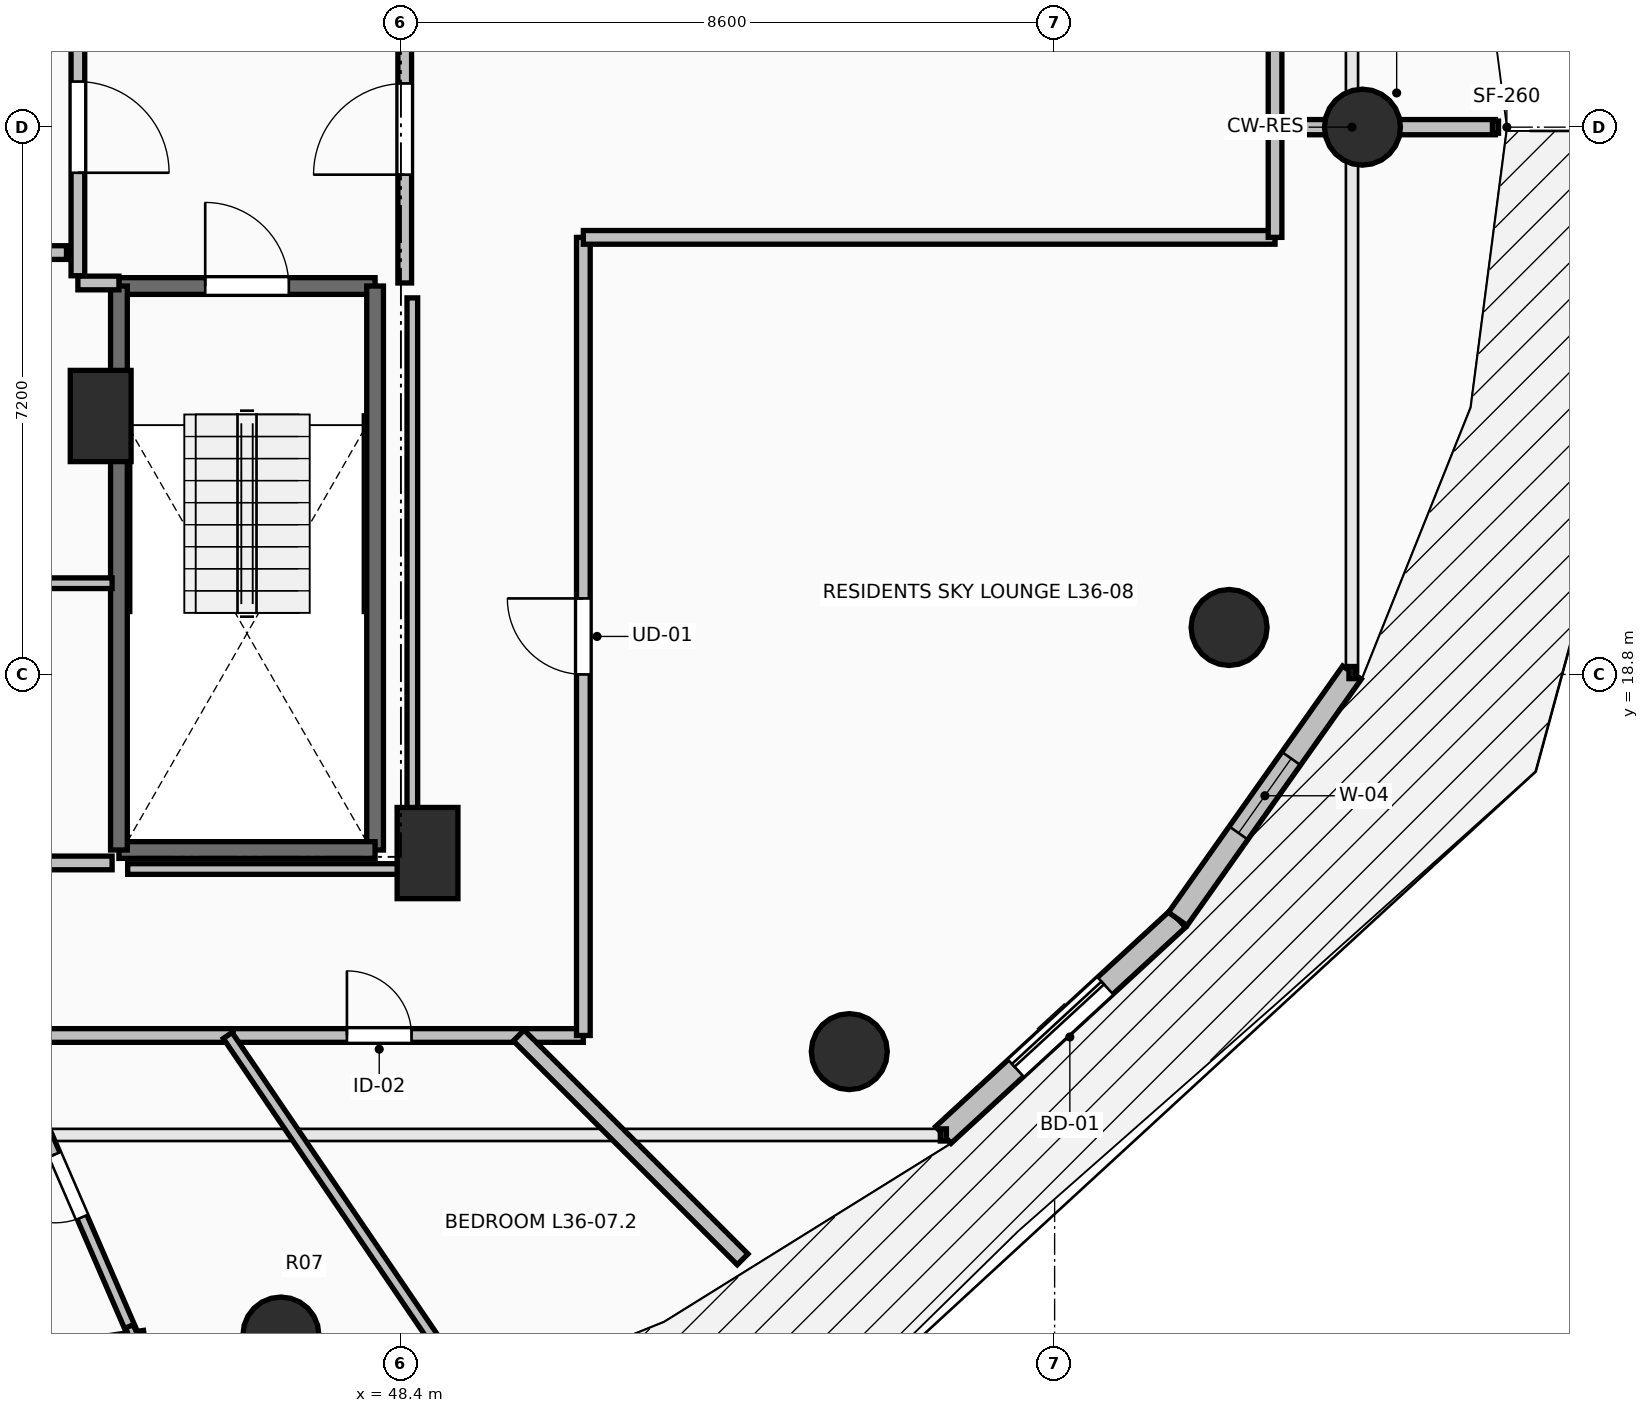
"""IFC4 building model, lengths in metres.
Left out: names, types, materials, properties, quantities, classifications, styles, units other than length and angle.
Written with IfcOpenShell. Run it as: python <this file> out.ifc"""

import sys

from ifc_helpers import new_model, si_unit, direction, frame, frame_2d, origin, origin_2d, place, context, subcontext, project, spatial, rectangle, circle, extrude, element, fill, save


model = new_model("IFC4")
c1 = context("Model", 3, precision=1e-05, world=origin(), true_north=direction((0.0, 1.0)))
c2 = subcontext(c1, "Body", "Model", "MODEL_VIEW")
j1 = project(units=[si_unit("LENGTHUNIT", "METRE"), si_unit("PLANEANGLEUNIT", "RADIAN")], contexts=[c1])
p1 = place(None, origin())
s1 = spatial("IfcSite", under=j1, at=p1, CompositionType="ELEMENT")
p2 = place(p1, origin())
s2 = spatial("IfcBuilding", under=s1, at=p2, CompositionType="ELEMENT")
p3 = place(p2, frame((0.0, 0.0, 136.1)))
s3 = spatial("IfcBuildingStorey", under=s2, at=p3, CompositionType="ELEMENT", Elevation=136.1)
for number, where, z_axis, x_axis in (
    (1, (61.05, 26.0, 0.0), (0.0, 0.0, 1.0), (1.0, 0.0, 0.0)),
    (2, (46.821, 10.109, 0.0), (0.0, 0.0, 1.0), (0.383, -0.924, 0.0)),
    (3, (54.299, 13.838, 0.0), (0.0, 0.0, 1.0), (0.707, -0.707, 0.0)),
    (4, (59.295, 19.418, 0.0), (0.0, 0.0, 1.0), (0.924, -0.383, 0.0)),
):
    element("IfcColumn", number, at=place(p3, frame(where, z_axis=z_axis, x_axis=x_axis)), inside=s3, PredefinedType="COLUMN", context=c2, shape_type="SweptSolid", body=[
        extrude(circle(Radius=0.5, at=origin_2d()), origin(), (0.0, 0.0, 1.0), 3.5),
    ])
for number, where, z_axis, x_axis in (
    (5, (48.75, 16.45, 0.0), (0.0, 0.0, 1.0), (1.0, 0.0, 0.0)),
    (6, (44.45, 22.2, 0.0), (0.0, 0.0, 1.0), (1.0, 0.0, 0.0)),
):
    element("IfcColumn", number, at=place(p3, frame(where, z_axis=z_axis, x_axis=x_axis)), inside=s3, PredefinedType="PILASTER", context=c2, shape_type="SweptSolid", body=[
        extrude(rectangle(XDim=0.8, YDim=1.2, at=origin_2d()), origin(), (0.0, 0.0, 1.0), 3.5),
    ])
p4 = place(p3, frame((55.536, 12.742, 0.0), z_axis=(0.0, 0.0, 1.0), x_axis=(0.735477154165, 0.677549522693, 0.0)))
e7 = element("IfcWall", 7, at=p4, inside=s3, PredefinedType="STANDARD", context=c2, shape_type="SweptSolid", body=[
    extrude(rectangle(XDim=4.194, YDim=0.3, at=frame_2d((2.097, 0.0))), origin(), (0.0, 0.0, 1.0), 3.24),
])
p5 = place(p4, frame((1.297, 0.0, 0.0)))
e8 = element("IfcOpeningElement", 8, at=p5, cuts=e7, PredefinedType="OPENING", context=c2, shape_type="SweptSolid", body=[
    extrude(rectangle(XDim=1.6, YDim=2.3, at=frame_2d((0.8, 1.15))), frame((0.0, 0.165, 0.0), z_axis=(0.0, -1.0, 0.0), x_axis=(1.0, 0.0, 0.0)), (0.0, 0.0, 1.0), 0.33),
])
p6 = place(p3, frame((58.62, 15.583, 0.0), z_axis=(0.0, 0.0, 1.0), x_axis=(0.577269753207, 0.816553508371, 0.0)))
e9 = element("IfcWall", 9, at=p6, inside=s3, PredefinedType="STANDARD", context=c2, shape_type="SweptSolid", body=[
    extrude(rectangle(XDim=3.97, YDim=0.3, at=frame_2d((1.985, 0.0))), origin(), (0.0, 0.0, 1.0), 3.24),
])
p7 = place(p6, frame((1.385, 0.0, 0.85)))
e10 = element("IfcOpeningElement", 10, at=p7, cuts=e9, PredefinedType="OPENING", context=c2, shape_type="SweptSolid", body=[
    extrude(rectangle(XDim=1.2, YDim=2.1, at=frame_2d((0.6, 1.05))), frame((0.0, 0.165, 0.0), z_axis=(0.0, -1.0, 0.0), x_axis=(1.0, 0.0, 0.0)), (0.0, 0.0, 1.0), 0.33),
])
p8 = place(p3, frame((44.69, 23.91, 0.0), z_axis=(0.0, 0.0, 1.0), x_axis=(1.0, 0.0, 0.0)))
e11 = element("IfcWall", 11, at=p8, inside=s3, PredefinedType="SOLIDWALL", context=c2, shape_type="SweptSolid", body=[
    extrude(rectangle(XDim=3.37, YDim=0.22, at=frame_2d((1.685, 0.0))), origin(), (0.0, 0.0, 1.0), 3.24),
])
p9 = place(p8, frame((1.135, 0.0, 0.0)))
e12 = element("IfcOpeningElement", 12, at=p9, cuts=e11, PredefinedType="OPENING", context=c2, shape_type="SweptSolid", body=[
    extrude(rectangle(XDim=1.1, YDim=2.15, at=frame_2d((0.55, 1.075))), frame((0.0, 0.125, 0.0), z_axis=(0.0, -1.0, 0.0), x_axis=(1.0, 0.0, 0.0)), (0.0, 0.0, 1.0), 0.25),
])
p10 = place(p3, frame((48.06, 23.91, 0.0), z_axis=(0.0, 0.0, 1.0), x_axis=(0.0, -1.0, 0.0)))
e13 = element("IfcWall", 13, at=p10, inside=s3, PredefinedType="SOLIDWALL", context=c2, shape_type="SweptSolid", body=[
    extrude(rectangle(XDim=7.42, YDim=0.22, at=frame_2d((3.71, 0.0))), origin(), (0.0, 0.0, 1.0), 3.24),
])
p11 = place(p3, frame((48.06, 16.49, 0.0), z_axis=(0.0, 0.0, 1.0), x_axis=(-1.0, 0.0, 0.0)))
e14 = element("IfcWall", 14, at=p11, inside=s3, PredefinedType="SOLIDWALL", context=c2, shape_type="SweptSolid", body=[
    extrude(rectangle(XDim=3.37, YDim=0.22, at=frame_2d((1.685, 0.0))), origin(), (0.0, 0.0, 1.0), 3.24),
])
p12 = place(p3, frame((44.69, 16.49, 0.0), z_axis=(0.0, 0.0, 1.0), x_axis=(0.0, 1.0, 0.0)))
e15 = element("IfcWall", 15, at=p12, inside=s3, PredefinedType="SOLIDWALL", context=c2, shape_type="SweptSolid", body=[
    extrude(rectangle(XDim=7.42, YDim=0.22, at=frame_2d((3.71, 0.0))), origin(), (0.0, 0.0, 1.0), 3.24),
])
p13 = place(p3, frame((44.15, 27.955, 0.0), z_axis=(0.0, 0.0, 1.0), x_axis=(0.0, -1.0, 0.0)))
e16 = element("IfcWall", 16, at=p13, inside=s3, PredefinedType="PARTITIONING", context=c2, shape_type="SweptSolid", body=[
    extrude(rectangle(XDim=3.91, YDim=0.18, at=frame_2d((1.955, 0.0))), origin(), (0.0, 0.0, 1.0), 3.24),
])
p14 = place(p13, frame((1.355, 0.0, 0.0)))
e17 = element("IfcOpeningElement", 17, at=p14, cuts=e16, PredefinedType="OPENING", context=c2, shape_type="SweptSolid", body=[
    extrude(rectangle(XDim=1.2, YDim=2.15, at=frame_2d((0.6, 1.075))), frame((0.0, 0.105, 0.0), z_axis=(0.0, -1.0, 0.0), x_axis=(1.0, 0.0, 0.0)), (0.0, 0.0, 1.0), 0.21),
])
p15 = place(p3, frame((44.15, 23.95, 0.0), z_axis=(0.0, 0.0, 1.0), x_axis=(1.0, 0.0, 0.0)))
e18 = element("IfcWall", 18, at=p15, inside=s3, PredefinedType="PARTITIONING", context=c2, shape_type="SweptSolid", body=[
    extrude(rectangle(XDim=0.54, YDim=0.18, at=frame_2d((0.27, 0.0))), origin(), (0.0, 0.0, 1.0), 3.24),
])
p16 = place(p3, frame((48.45, 23.95, 0.0), z_axis=(0.0, 0.0, 1.0), x_axis=(0.0, 1.0, 0.0)))
e19 = element("IfcWall", 19, at=p16, inside=s3, PredefinedType="PARTITIONING", context=c2, shape_type="SweptSolid", body=[
    extrude(rectangle(XDim=4.05, YDim=0.18, at=frame_2d((2.025, 0.0))), origin(), (0.0, 0.0, 1.0), 3.24),
])
p17 = place(p16, frame((1.425, 0.0, 0.0)))
e20 = element("IfcOpeningElement", 20, at=p17, cuts=e19, PredefinedType="OPENING", context=c2, shape_type="SweptSolid", body=[
    extrude(rectangle(XDim=1.2, YDim=2.15, at=frame_2d((0.6, 1.075))), frame((0.0, 0.105, 0.0), z_axis=(0.0, -1.0, 0.0), x_axis=(1.0, 0.0, 0.0)), (0.0, 0.0, 1.0), 0.21),
])
p18 = place(p3, frame((41.555, 24.35, 0.0), z_axis=(0.0, 0.0, 1.0), x_axis=(1.0, 0.0, 0.0)))
e21 = element("IfcWall", 21, at=p18, inside=s3, PredefinedType="PARTITIONING", context=c2, shape_type="SweptSolid", body=[
    extrude(rectangle(XDim=2.445, YDim=0.18, at=frame_2d((1.223, 0.0))), origin(), (0.0, 0.0, 1.0), 3.24),
])
p19 = place(p18, frame((0.798, 0.0, 0.0)))
e22 = element("IfcOpeningElement", 22, at=p19, cuts=e21, PredefinedType="OPENING", context=c2, shape_type="SweptSolid", body=[
    extrude(rectangle(XDim=0.85, YDim=2.1, at=frame_2d((0.425, 1.05))), frame((0.0, 0.105, 0.0), z_axis=(0.0, -1.0, 0.0), x_axis=(1.0, 0.0, 0.0)), (0.0, 0.0, 1.0), 0.21),
])
p20 = place(p3, frame((44.6, 20.0, 0.0), z_axis=(0.0, 0.0, 1.0), x_axis=(-1.0, 0.0, 0.0)))
e23 = element("IfcWall", 23, at=p20, inside=s3, PredefinedType="PARTITIONING", context=c2, shape_type="SweptSolid", body=[
    extrude(rectangle(XDim=3.2, YDim=0.14, at=frame_2d((1.6, 0.0))), origin(), (0.0, 0.0, 1.0), 3.24),
])
p21 = place(p3, frame((41.4, 16.32, 0.0), z_axis=(0.0, 0.0, 1.0), x_axis=(1.0, 0.0, 0.0)))
e24 = element("IfcWall", 24, at=p21, inside=s3, PredefinedType="PARTITIONING", context=c2, shape_type="SweptSolid", body=[
    extrude(rectangle(XDim=3.2, YDim=0.18, at=frame_2d((1.6, 0.0))), origin(), (0.0, 0.0, 1.0), 3.24),
])
p22 = place(p21, frame((1.2, 0.0, 0.0)))
e25 = element("IfcOpeningElement", 25, at=p22, cuts=e24, PredefinedType="OPENING", context=c2, shape_type="SweptSolid", body=[
    extrude(rectangle(XDim=0.8, YDim=2.05, at=frame_2d((0.4, 1.025))), frame((0.0, 0.105, 0.0), z_axis=(0.0, -1.0, 0.0), x_axis=(1.0, 0.0, 0.0)), (0.0, 0.0, 1.0), 0.21),
])
p23 = place(p3, frame((59.9, 25.94, 0.0), z_axis=(0.0, 0.0, 1.0), x_axis=(0.0, 1.0, 0.0)))
e26 = element("IfcWall", 26, at=p23, inside=s3, PredefinedType="PARTITIONING", context=c2, shape_type="SweptSolid", body=[
    extrude(rectangle(XDim=1.31, YDim=0.18, at=frame_2d((0.655, 0.0))), origin(), (0.0, 0.0, 1.0), 2.432),
])
p24 = place(p3, frame((43.236, 14.05, 0.0), z_axis=(0.0, 0.0, 1.0), x_axis=(1.0, 0.0, 0.0)))
e27 = element("IfcWall", 27, at=p24, inside=s3, PredefinedType="PARTITIONING", context=c2, shape_type="SweptSolid", body=[
    extrude(rectangle(XDim=2.958, YDim=0.18, at=frame_2d((1.479, 0.0))), origin(), (0.0, 0.0, 1.0), 2.432),
])
p25 = place(p3, frame((46.194, 14.05, 0.0), z_axis=(0.0, 0.0, 1.0), x_axis=(1.0, 0.0, 0.0)))
e28 = element("IfcWall", 28, at=p25, inside=s3, PredefinedType="PARTITIONING", context=c2, shape_type="SweptSolid", body=[
    extrude(rectangle(XDim=3.841, YDim=0.18, at=frame_2d((1.92, 0.0))), origin(), (0.0, 0.0, 1.0), 2.432),
])
p26 = place(p25, frame((1.496, 0.0, 0.0)))
e29 = element("IfcOpeningElement", 29, at=p26, cuts=e28, PredefinedType="OPENING", context=c2, shape_type="SweptSolid", body=[
    extrude(rectangle(XDim=0.85, YDim=2.1, at=frame_2d((0.425, 1.05))), frame((0.0, 0.105, 0.0), z_axis=(0.0, -1.0, 0.0), x_axis=(1.0, 0.0, 0.0)), (0.0, 0.0, 1.0), 0.21),
])
p27 = place(p3, frame((50.035, 14.05, 0.0), z_axis=(0.0, 0.0, 1.0), x_axis=(1.0, 0.0, 0.0)))
e30 = element("IfcWall", 30, at=p27, inside=s3, PredefinedType="PARTITIONING", context=c2, shape_type="SweptSolid", body=[
    extrude(rectangle(XDim=0.765, YDim=0.18, at=frame_2d((0.383, 0.0))), origin(), (0.0, 0.0, 1.0), 2.874),
])
p28 = place(p3, frame((50.8, 14.05, 0.0), z_axis=(0.0, 0.0, 1.0), x_axis=(0.0, 1.0, 0.0)))
e31 = element("IfcWall", 31, at=p28, inside=s3, PredefinedType="PARTITIONING", context=c2, shape_type="SweptSolid", body=[
    extrude(rectangle(XDim=10.5, YDim=0.18, at=frame_2d((5.25, 0.0))), origin(), (0.0, 0.0, 1.0), 2.432),
])
p29 = place(p28, frame((4.75, 0.0, 0.0)))
e32 = element("IfcOpeningElement", 32, at=p29, cuts=e31, PredefinedType="OPENING", context=c2, shape_type="SweptSolid", body=[
    extrude(rectangle(XDim=1.0, YDim=2.15, at=frame_2d((0.5, 1.075))), frame((0.0, 0.105, 0.0), z_axis=(0.0, -1.0, 0.0), x_axis=(1.0, 0.0, 0.0)), (0.0, 0.0, 1.0), 0.21),
])
p30 = place(p3, frame((50.8, 24.55, 0.0), z_axis=(0.0, 0.0, 1.0), x_axis=(1.0, 0.0, 0.0)))
e33 = element("IfcWall", 33, at=p30, inside=s3, PredefinedType="PARTITIONING", context=c2, shape_type="SweptSolid", body=[
    extrude(rectangle(XDim=9.1, YDim=0.18, at=frame_2d((4.55, 0.0))), origin(), (0.0, 0.0, 1.0), 2.432),
])
p31 = place(p3, frame((59.9, 24.55, 0.0), z_axis=(0.0, 0.0, 1.0), x_axis=(0.0, 1.0, 0.0)))
e34 = element("IfcWall", 34, at=p31, inside=s3, PredefinedType="PARTITIONING", context=c2, shape_type="SweptSolid", body=[
    extrude(rectangle(XDim=1.39, YDim=0.18, at=frame_2d((0.695, 0.0))), origin(), (0.0, 0.0, 1.0), 2.432),
])
p32 = place(p3, frame((59.9, 26.0, 0.0), z_axis=(0.0, 0.0, 1.0), x_axis=(1.0, 0.0, 0.0)))
e35 = element("IfcWall", 35, at=p32, inside=s3, PredefinedType="PARTITIONING", context=c2, shape_type="SweptSolid", body=[
    extrude(rectangle(XDim=2.899, YDim=0.2, at=frame_2d((1.45, 0.0))), origin(), (0.0, 0.0, 1.0), 2.432),
])
p33 = place(p3, frame((41.128, 9.53, 0.0), z_axis=(0.0, 0.0, 1.0), x_axis=(0.988884902331, 0.148683051965, 0.0)))
e36 = element("IfcWall", 36, at=p33, inside=s3, PredefinedType="PARTITIONING", context=c2, shape_type="SweptSolid", body=[
    extrude(rectangle(XDim=3.938, YDim=0.11, at=frame_2d((1.969, 0.0))), origin(), (0.0, 0.0, 1.0), 3.24),
])
p34 = place(p33, frame((1.519, 0.0, 0.0)))
e37 = element("IfcOpeningElement", 37, at=p34, cuts=e36, PredefinedType="OPENING", context=c2, shape_type="SweptSolid", body=[
    extrude(rectangle(XDim=0.9, YDim=2.1, at=frame_2d((0.45, 1.05))), frame((0.0, 0.07, 0.0), z_axis=(0.0, -1.0, 0.0), x_axis=(1.0, 0.0, 0.0)), (0.0, 0.0, 1.0), 0.14),
])
p35 = place(p3, frame((44.883, 10.095, 0.0), z_axis=(0.0, 0.0, 1.0), x_axis=(-0.397273563399, 0.917700232006, 0.0)))
e38 = element("IfcWall", 38, at=p35, inside=s3, PredefinedType="PARTITIONING", context=c2, shape_type="SweptSolid", body=[
    extrude(rectangle(XDim=4.31, YDim=0.14, at=frame_2d((2.155, 0.0))), origin(), (0.0, 0.0, 1.0), 2.432),
])
p36 = place(p35, frame((1.705, 0.0, 0.0)))
e39 = element("IfcOpeningElement", 39, at=p36, cuts=e38, PredefinedType="OPENING", context=c2, shape_type="SweptSolid", body=[
    extrude(rectangle(XDim=0.9, YDim=2.1, at=frame_2d((0.45, 1.05))), frame((0.0, 0.085, 0.0), z_axis=(0.0, -1.0, 0.0), x_axis=(1.0, 0.0, 0.0)), (0.0, 0.0, 1.0), 0.17),
])
p37 = place(p3, frame((45.732, 8.134, 0.0), z_axis=(0.0, 0.0, 1.0), x_axis=(-0.397125966554, 0.91776411277, 0.0)))
e40 = element("IfcWall", 40, at=p37, inside=s3, PredefinedType="PARTITIONING", context=c2, shape_type="SweptSolid", body=[
    extrude(rectangle(XDim=2.277, YDim=0.11, at=frame_2d((1.139, 0.0))), origin(), (0.0, 0.0, 1.0), 2.728),
])
p38 = place(p3, frame((49.28, 9.402, 0.0), z_axis=(0.0, 0.0, 1.0), x_axis=(-0.562106811751, 0.827064648128, 0.0)))
e41 = element("IfcWall", 41, at=p38, inside=s3, PredefinedType="PARTITIONING", context=c2, shape_type="SweptSolid", body=[
    extrude(rectangle(XDim=5.62, YDim=0.14, at=frame_2d((2.81, 0.0))), origin(), (0.0, 0.0, 1.0), 2.432),
])
p39 = place(p3, frame((52.895, 11.105, 0.0), z_axis=(0.0, 0.0, 1.0), x_axis=(-0.707106781187, 0.707106781187, 0.0)))
e42 = element("IfcWall", 42, at=p39, inside=s3, PredefinedType="PARTITIONING", context=c2, shape_type="SweptSolid", body=[
    extrude(rectangle(XDim=4.165, YDim=0.2, at=frame_2d((2.083, 0.0))), origin(), (0.0, 0.0, 1.0), 2.728),
])
p40 = place(p3, frame((48.55, 16.24, 0.0), z_axis=(0.0, 0.0, 1.0), x_axis=(0.0, 1.0, 0.0)))
e43 = element("IfcWall", 43, at=p40, inside=s3, PredefinedType="PARTITIONING", context=c2, shape_type="SweptSolid", body=[
    extrude(rectangle(XDim=7.514, YDim=0.14, at=frame_2d((3.757, 0.0))), origin(), (0.0, 0.0, 1.0), 2.432),
])
p41 = place(p3, frame((44.805, 16.24, 0.0), z_axis=(0.0, 0.0, 1.0), x_axis=(1.0, 0.0, 0.0)))
e44 = element("IfcWall", 44, at=p41, inside=s3, PredefinedType="PARTITIONING", context=c2, shape_type="SweptSolid", body=[
    extrude(rectangle(XDim=3.745, YDim=0.14, at=frame_2d((1.873, 0.0))), origin(), (0.0, 0.0, 1.0), 2.432),
])
p42 = place(p5, origin())
e45 = element("IfcDoor", 45, at=p42, inside=s3, OperationType="SLIDING_TO_LEFT", PredefinedType="DOOR", context=c2, shape_type="SweptSolid", body=[
    extrude(rectangle(XDim=1.6, YDim=2.3, at=frame_2d((0.8, 1.15))), frame((0.0, 0.025, 0.0), z_axis=(0.0, -1.0, 0.0), x_axis=(1.0, 0.0, 0.0)), (0.0, 0.0, 1.0), 0.05),
])
fill(e8, e45)
p43 = place(p7, origin())
e46 = element("IfcWindow", 46, at=p43, inside=s3, PartitioningType="SINGLE_PANEL", PredefinedType="WINDOW", context=c2, shape_type="SweptSolid", body=[
    extrude(rectangle(XDim=1.2, YDim=2.1, at=frame_2d((0.6, 1.05))), frame((0.0, 0.03, 0.0), z_axis=(0.0, -1.0, 0.0), x_axis=(1.0, 0.0, 0.0)), (0.0, 0.0, 1.0), 0.06),
])
fill(e10, e46)
p44 = place(p9, origin())
e47 = element("IfcDoor", 47, at=p44, inside=s3, OperationType="SINGLE_SWING_LEFT", PredefinedType="DOOR", context=c2, shape_type="SweptSolid", body=[
    extrude(rectangle(XDim=1.1, YDim=2.15, at=frame_2d((0.55, 1.075))), frame((0.0, 0.025, 0.0), z_axis=(0.0, -1.0, 0.0), x_axis=(1.0, 0.0, 0.0)), (0.0, 0.0, 1.0), 0.05),
])
fill(e12, e47)
p45 = place(p14, origin())
e48 = element("IfcDoor", 48, at=p45, inside=s3, OperationType="SINGLE_SWING_RIGHT", PredefinedType="DOOR", context=c2, shape_type="SweptSolid", body=[
    extrude(rectangle(XDim=1.2, YDim=2.15, at=frame_2d((0.6, 1.075))), frame((0.0, 0.025, 0.0), z_axis=(0.0, -1.0, 0.0), x_axis=(1.0, 0.0, 0.0)), (0.0, 0.0, 1.0), 0.05),
])
fill(e17, e48)
p46 = place(p17, origin())
e49 = element("IfcDoor", 49, at=p46, inside=s3, OperationType="SINGLE_SWING_LEFT", PredefinedType="DOOR", context=c2, shape_type="SweptSolid", body=[
    extrude(rectangle(XDim=1.2, YDim=2.15, at=frame_2d((0.6, 1.075))), frame((0.0, 0.025, 0.0), z_axis=(0.0, -1.0, 0.0), x_axis=(1.0, 0.0, 0.0)), (0.0, 0.0, 1.0), 0.05),
])
fill(e20, e49)
p47 = place(p29, origin())
e50 = element("IfcDoor", 50, at=p47, inside=s3, OperationType="SINGLE_SWING_RIGHT", PredefinedType="DOOR", context=c2, shape_type="SweptSolid", body=[
    extrude(rectangle(XDim=1.0, YDim=2.15, at=frame_2d((0.5, 1.075))), frame((0.0, 0.025, 0.0), z_axis=(0.0, -1.0, 0.0), x_axis=(1.0, 0.0, 0.0)), (0.0, 0.0, 1.0), 0.05),
])
fill(e32, e50)
p48 = place(p36, origin())
e51 = element("IfcDoor", 51, at=p48, inside=s3, OperationType="SINGLE_SWING_RIGHT", PredefinedType="DOOR", context=c2, shape_type="SweptSolid", body=[
    extrude(rectangle(XDim=0.9, YDim=2.1, at=frame_2d((0.45, 1.05))), frame((0.0, 0.025, 0.0), z_axis=(0.0, -1.0, 0.0), x_axis=(1.0, 0.0, 0.0)), (0.0, 0.0, 1.0), 0.05),
])
fill(e39, e51)
p49 = place(p26, origin())
e52 = element("IfcDoor", 52, at=p49, inside=s3, OperationType="SINGLE_SWING_LEFT", PredefinedType="DOOR", context=c2, shape_type="SweptSolid", body=[
    extrude(rectangle(XDim=0.85, YDim=2.1, at=frame_2d((0.425, 1.05))), frame((0.0, 0.025, 0.0), z_axis=(0.0, -1.0, 0.0), x_axis=(1.0, 0.0, 0.0)), (0.0, 0.0, 1.0), 0.05),
])
fill(e29, e52)
save(model, sys.argv[1])
